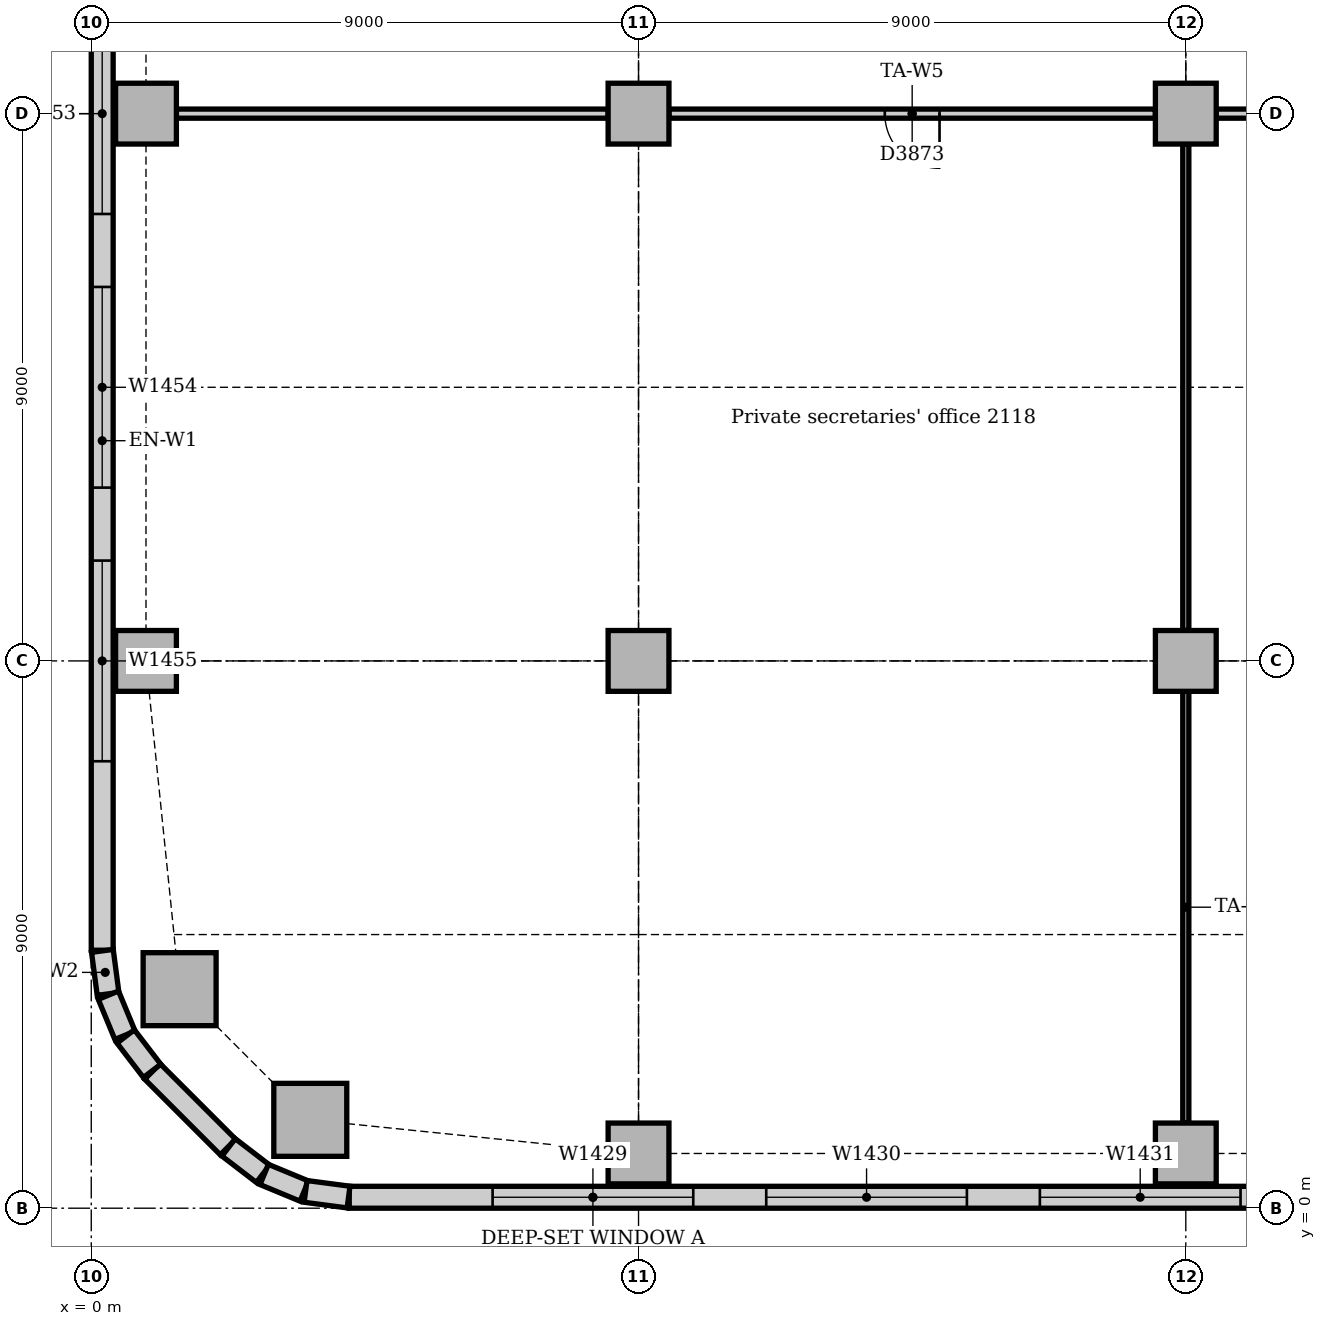
"""IFC4 building model, lengths in metres.
Left out: names, types, materials, properties, quantities, classifications, styles, units other than length and angle.
Written with IfcOpenShell. Run it as: python <this file> out.ifc"""

import sys

from ifc_helpers import new_model, si_unit, direction, frame, frame_2d, origin, origin_2d, place, context, subcontext, project, spatial, rectangle, extrude, element, fill, save


model = new_model("IFC4")
c1 = context("Model", 3, precision=1e-05, world=origin(), true_north=direction((0.0, 1.0)))
c2 = subcontext(c1, "Body", "Model", "MODEL_VIEW")
j1 = project(units=[si_unit("LENGTHUNIT", "METRE"), si_unit("PLANEANGLEUNIT", "RADIAN")], contexts=[c1])
p1 = place(None, origin())
s1 = spatial("IfcSite", under=j1, at=p1, CompositionType="ELEMENT")
p2 = place(p1, origin())
s2 = spatial("IfcBuilding", under=s1, at=p2, CompositionType="ELEMENT")
p3 = place(p2, frame((0.0, 0.0, 91.0)))
s3 = spatial("IfcBuildingStorey", under=s2, at=p3, CompositionType="ELEMENT", Elevation=91.0)
for number, where, z_axis, x_axis in (
    (1, (3.602, 1.453, 0.0), (0.0, 0.0, 1.0), (1.0, 0.0, 0.0)),
    (2, (1.453, 3.602, 0.0), (0.0, 0.0, 1.0), (1.0, 0.0, 0.0)),
):
    element("IfcColumn", number, at=place(p3, frame(where, z_axis=z_axis, x_axis=x_axis)), inside=s3, PredefinedType="COLUMN", context=c2, shape_type="SweptSolid", body=[
        extrude(rectangle(XDim=1.2, YDim=1.2, at=origin_2d()), origin(), (0.0, 0.0, 1.0), 3.7),
    ])
for number, where, z_axis, x_axis in (
    (3, (9.0, 0.9, 0.0), (0.0, 0.0, 1.0), (1.0, 0.0, 0.0)),
    (4, (18.0, 0.9, 0.0), (0.0, 0.0, 1.0), (1.0, 0.0, 0.0)),
    (5, (0.9, 9.0, 0.0), (0.0, 0.0, 1.0), (1.0, 0.0, 0.0)),
    (6, (0.9, 18.0, 0.0), (0.0, 0.0, 1.0), (1.0, 0.0, 0.0)),
    (7, (9.0, 9.0, 0.0), (0.0, 0.0, 1.0), (1.0, 0.0, 0.0)),
    (8, (9.0, 18.0, 0.0), (0.0, 0.0, 1.0), (1.0, 0.0, 0.0)),
    (9, (18.0, 9.0, 0.0), (0.0, 0.0, 1.0), (1.0, 0.0, 0.0)),
    (10, (18.0, 18.0, 0.0), (0.0, 0.0, 1.0), (1.0, 0.0, 0.0)),
):
    element("IfcColumn", number, at=place(p3, frame(where, z_axis=z_axis, x_axis=x_axis)), inside=s3, PredefinedType="COLUMN", context=c2, shape_type="SweptSolid", body=[
        extrude(rectangle(XDim=1.0, YDim=1.0, at=origin_2d()), origin(), (0.0, 0.0, 1.0), 3.7),
    ])
p4 = place(p3, frame((4.243, 0.18, 0.0), z_axis=(0.0, 0.0, 1.0), x_axis=(1.0, 0.0, 0.0)))
e11 = element("IfcWall", 11, at=p4, inside=s3, PredefinedType="STANDARD", context=c2, shape_type="SweptSolid", body=[
    extrude(rectangle(XDim=44.015, YDim=0.36, at=frame_2d((22.007, 0.0))), origin(), (0.0, 0.0, 1.0), 3.7),
])
p5 = place(p4, frame((2.357, 0.0, 0.9)))
e12 = element("IfcOpeningElement", 12, at=p5, cuts=e11, PredefinedType="OPENING", context=c2, shape_type="SweptSolid", body=[
    extrude(rectangle(XDim=3.3, YDim=1.6, at=frame_2d((1.65, 0.8))), frame((0.0, 0.19, 0.0), z_axis=(0.0, -1.0, 0.0), x_axis=(1.0, 0.0, 0.0)), (0.0, 0.0, 1.0), 0.38),
])
p6 = place(p4, frame((6.857, 0.0, 0.9)))
e13 = element("IfcOpeningElement", 13, at=p6, cuts=e11, PredefinedType="OPENING", context=c2, shape_type="SweptSolid", body=[
    extrude(rectangle(XDim=3.3, YDim=1.6, at=frame_2d((1.65, 0.8))), frame((0.0, 0.19, 0.0), z_axis=(0.0, -1.0, 0.0), x_axis=(1.0, 0.0, 0.0)), (0.0, 0.0, 1.0), 0.38),
])
p7 = place(p4, frame((11.357, 0.0, 0.9)))
e14 = element("IfcOpeningElement", 14, at=p7, cuts=e11, PredefinedType="OPENING", context=c2, shape_type="SweptSolid", body=[
    extrude(rectangle(XDim=3.3, YDim=1.6, at=frame_2d((1.65, 0.8))), frame((0.0, 0.19, 0.0), z_axis=(0.0, -1.0, 0.0), x_axis=(1.0, 0.0, 0.0)), (0.0, 0.0, 1.0), 0.38),
])
p8 = place(p4, frame((15.857, 0.0, 0.9)))
e15 = element("IfcOpeningElement", 15, at=p8, cuts=e11, PredefinedType="OPENING", context=c2, shape_type="SweptSolid", body=[
    extrude(rectangle(XDim=3.3, YDim=1.6, at=frame_2d((1.65, 0.8))), frame((0.0, 0.19, 0.0), z_axis=(0.0, -1.0, 0.0), x_axis=(1.0, 0.0, 0.0)), (0.0, 0.0, 1.0), 0.38),
])
p9 = place(p4, frame((20.357, 0.0, 0.9)))
e16 = element("IfcOpeningElement", 16, at=p9, cuts=e11, PredefinedType="OPENING", context=c2, shape_type="SweptSolid", body=[
    extrude(rectangle(XDim=3.3, YDim=1.6, at=frame_2d((1.65, 0.8))), frame((0.0, 0.19, 0.0), z_axis=(0.0, -1.0, 0.0), x_axis=(1.0, 0.0, 0.0)), (0.0, 0.0, 1.0), 0.38),
])
p10 = place(p4, frame((24.857, 0.0, 0.9)))
e17 = element("IfcOpeningElement", 17, at=p10, cuts=e11, PredefinedType="OPENING", context=c2, shape_type="SweptSolid", body=[
    extrude(rectangle(XDim=3.3, YDim=1.6, at=frame_2d((1.65, 0.8))), frame((0.0, 0.19, 0.0), z_axis=(0.0, -1.0, 0.0), x_axis=(1.0, 0.0, 0.0)), (0.0, 0.0, 1.0), 0.38),
])
p11 = place(p4, frame((29.357, 0.0, 0.9)))
e18 = element("IfcOpeningElement", 18, at=p11, cuts=e11, PredefinedType="OPENING", context=c2, shape_type="SweptSolid", body=[
    extrude(rectangle(XDim=3.3, YDim=1.6, at=frame_2d((1.65, 0.8))), frame((0.0, 0.19, 0.0), z_axis=(0.0, -1.0, 0.0), x_axis=(1.0, 0.0, 0.0)), (0.0, 0.0, 1.0), 0.38),
])
p12 = place(p4, frame((33.857, 0.0, 0.9)))
e19 = element("IfcOpeningElement", 19, at=p12, cuts=e11, PredefinedType="OPENING", context=c2, shape_type="SweptSolid", body=[
    extrude(rectangle(XDim=3.3, YDim=1.6, at=frame_2d((1.65, 0.8))), frame((0.0, 0.19, 0.0), z_axis=(0.0, -1.0, 0.0), x_axis=(1.0, 0.0, 0.0)), (0.0, 0.0, 1.0), 0.38),
])
p13 = place(p4, frame((38.357, 0.0, 0.9)))
e20 = element("IfcOpeningElement", 20, at=p13, cuts=e11, PredefinedType="OPENING", context=c2, shape_type="SweptSolid", body=[
    extrude(rectangle(XDim=3.3, YDim=1.6, at=frame_2d((1.65, 0.8))), frame((0.0, 0.19, 0.0), z_axis=(0.0, -1.0, 0.0), x_axis=(1.0, 0.0, 0.0)), (0.0, 0.0, 1.0), 0.38),
])
p14 = place(p3, frame((0.18, 21.0, 0.0), z_axis=(0.0, 0.0, 1.0), x_axis=(0.0, -1.0, 0.0)))
e21 = element("IfcWall", 21, at=p14, inside=s3, PredefinedType="STANDARD", context=c2, shape_type="SweptSolid", body=[
    extrude(rectangle(XDim=16.757, YDim=0.36, at=frame_2d((8.379, 0.0))), origin(), (0.0, 0.0, 1.0), 3.7),
])
p15 = place(p14, frame((1.35, 0.0, 0.9)))
e22 = element("IfcOpeningElement", 22, at=p15, cuts=e21, PredefinedType="OPENING", context=c2, shape_type="SweptSolid", body=[
    extrude(rectangle(XDim=3.3, YDim=1.6, at=frame_2d((1.65, 0.8))), frame((0.0, 0.19, 0.0), z_axis=(0.0, -1.0, 0.0), x_axis=(1.0, 0.0, 0.0)), (0.0, 0.0, 1.0), 0.38),
])
p16 = place(p14, frame((5.85, 0.0, 0.9)))
e23 = element("IfcOpeningElement", 23, at=p16, cuts=e21, PredefinedType="OPENING", context=c2, shape_type="SweptSolid", body=[
    extrude(rectangle(XDim=3.3, YDim=1.6, at=frame_2d((1.65, 0.8))), frame((0.0, 0.19, 0.0), z_axis=(0.0, -1.0, 0.0), x_axis=(1.0, 0.0, 0.0)), (0.0, 0.0, 1.0), 0.38),
])
p17 = place(p14, frame((10.35, 0.0, 0.9)))
e24 = element("IfcOpeningElement", 24, at=p17, cuts=e21, PredefinedType="OPENING", context=c2, shape_type="SweptSolid", body=[
    extrude(rectangle(XDim=3.3, YDim=1.6, at=frame_2d((1.65, 0.8))), frame((0.0, 0.19, 0.0), z_axis=(0.0, -1.0, 0.0), x_axis=(1.0, 0.0, 0.0)), (0.0, 0.0, 1.0), 0.38),
])
p18 = place(p3, frame((1.006, 2.249, 0.0), z_axis=(0.0, 0.0, 1.0), x_axis=(0.707106781187, -0.707106781187, 0.0)))
e25 = element("IfcWall", 25, at=p18, inside=s3, PredefinedType="STANDARD", context=c2, shape_type="SweptSolid", body=[
    extrude(rectangle(XDim=1.757, YDim=0.36, at=frame_2d((0.879, 0.0))), origin(), (0.0, 0.0, 1.0), 3.7),
])
for number, where, z_axis, x_axis in (
    (26, (0.183, 4.231, 0.0), (0.0, 0.0, 1.0), (0.131, -0.991, 0.0)),
    (27, (0.282, 3.503, 0.0), (0.0, 0.0, 1.0), (0.383, -0.924, 0.0)),
):
    element("IfcWall", number, at=place(p3, frame(where, z_axis=z_axis, x_axis=x_axis)), inside=s3, PredefinedType="STANDARD", context=c2, shape_type="SweptSolid", body=[
        extrude(rectangle(XDim=0.713, YDim=0.36, at=frame_2d((0.356, 0.0))), origin(), (0.0, 0.0, 1.0), 3.7),
    ])
for number, where, z_axis, x_axis in (
    (28, (0.566, 2.825, 0.0), (0.0, 0.0, 1.0), (0.609, -0.793, 0.0)),
    (29, (2.259, 1.0, 0.0), (0.0, 0.0, 1.0), (0.793, -0.609, 0.0)),
):
    element("IfcWall", number, at=place(p3, frame(where, z_axis=z_axis, x_axis=x_axis)), inside=s3, PredefinedType="STANDARD", context=c2, shape_type="SweptSolid", body=[
        extrude(rectangle(XDim=0.713, YDim=0.36, at=frame_2d((0.357, 0.0))), origin(), (0.0, 0.0, 1.0), 3.7),
    ])
for number, where, z_axis, x_axis in (
    (30, (2.844, 0.555, 0.0), (0.0, 0.0, 1.0), (0.924, -0.383, 0.0)),
    (31, (3.524, 0.276, 0.0), (0.0, 0.0, 1.0), (0.991, -0.131, 0.0)),
):
    element("IfcWall", number, at=place(p3, frame(where, z_axis=z_axis, x_axis=x_axis)), inside=s3, PredefinedType="STANDARD", context=c2, shape_type="SweptSolid", body=[
        extrude(rectangle(XDim=0.713, YDim=0.36, at=frame_2d((0.356, 0.0))), origin(), (0.0, 0.0, 1.0), 3.7),
    ])
p19 = place(p3, frame((18.5, 18.0, 0.0), z_axis=(0.0, 0.0, 1.0), x_axis=(1.0, 0.0, 0.0)))
e32 = element("IfcWall", 32, at=p19, inside=s3, PredefinedType="PARTITIONING", context=c2, shape_type="SweptSolid", body=[
    extrude(rectangle(XDim=8.0, YDim=0.15, at=frame_2d((4.0, 0.0))), origin(), (0.0, 0.0, 1.0), 3.0),
])
p20 = place(p3, frame((9.5, 18.0, 0.0), z_axis=(0.0, 0.0, 1.0), x_axis=(1.0, 0.0, 0.0)))
e33 = element("IfcWall", 33, at=p20, inside=s3, PredefinedType="PARTITIONING", context=c2, shape_type="SweptSolid", body=[
    extrude(rectangle(XDim=8.0, YDim=0.15, at=frame_2d((4.0, 0.0))), origin(), (0.0, 0.0, 1.0), 3.0),
])
p21 = place(p20, frame((3.55, 0.0, 0.0)))
e34 = element("IfcOpeningElement", 34, at=p21, cuts=e33, PredefinedType="OPENING", context=c2, shape_type="SweptSolid", body=[
    extrude(rectangle(XDim=0.9, YDim=2.1, at=frame_2d((0.45, 1.05))), frame((0.0, 0.085, 0.0), z_axis=(0.0, -1.0, 0.0), x_axis=(1.0, 0.0, 0.0)), (0.0, 0.0, 1.0), 0.17),
])
p22 = place(p3, frame((1.4, 18.0, 0.0), z_axis=(0.0, 0.0, 1.0), x_axis=(1.0, 0.0, 0.0)))
e35 = element("IfcWall", 35, at=p22, inside=s3, PredefinedType="PARTITIONING", context=c2, shape_type="SweptSolid", body=[
    extrude(rectangle(XDim=7.1, YDim=0.15, at=frame_2d((3.55, 0.0))), origin(), (0.0, 0.0, 1.0), 3.0),
])
p23 = place(p3, frame((18.0, 1.4, 0.0), z_axis=(0.0, 0.0, 1.0), x_axis=(0.0, 1.0, 0.0)))
e36 = element("IfcWall", 36, at=p23, inside=s3, PredefinedType="PARTITIONING", context=c2, shape_type="SweptSolid", body=[
    extrude(rectangle(XDim=7.1, YDim=0.1, at=frame_2d((3.55, 0.0))), origin(), (0.0, 0.0, 1.0), 3.008),
])
p24 = place(p3, frame((18.0, 9.5, 0.0), z_axis=(0.0, 0.0, 1.0), x_axis=(0.0, 1.0, 0.0)))
e37 = element("IfcWall", 37, at=p24, inside=s3, PredefinedType="PARTITIONING", context=c2, shape_type="SweptSolid", body=[
    extrude(rectangle(XDim=8.0, YDim=0.1, at=frame_2d((4.0, 0.0))), origin(), (0.0, 0.0, 1.0), 3.008),
])
p25 = place(p5, origin())
e38 = element("IfcWindow", 38, at=p25, inside=s3, PartitioningType="SINGLE_PANEL", PredefinedType="WINDOW", context=c2, shape_type="SweptSolid", body=[
    extrude(rectangle(XDim=3.3, YDim=1.6, at=frame_2d((1.65, 0.8))), frame((0.0, 0.13, 0.0), z_axis=(0.0, -1.0, 0.0), x_axis=(1.0, 0.0, 0.0)), (0.0, 0.0, 1.0), 0.06),
])
fill(e12, e38)
p26 = place(p6, origin())
e39 = element("IfcWindow", 39, at=p26, inside=s3, PartitioningType="SINGLE_PANEL", PredefinedType="WINDOW", context=c2, shape_type="SweptSolid", body=[
    extrude(rectangle(XDim=3.3, YDim=1.6, at=frame_2d((1.65, 0.8))), frame((0.0, 0.13, 0.0), z_axis=(0.0, -1.0, 0.0), x_axis=(1.0, 0.0, 0.0)), (0.0, 0.0, 1.0), 0.06),
])
fill(e13, e39)
p27 = place(p7, origin())
e40 = element("IfcWindow", 40, at=p27, inside=s3, PartitioningType="SINGLE_PANEL", PredefinedType="WINDOW", context=c2, shape_type="SweptSolid", body=[
    extrude(rectangle(XDim=3.3, YDim=1.6, at=frame_2d((1.65, 0.8))), frame((0.0, 0.13, 0.0), z_axis=(0.0, -1.0, 0.0), x_axis=(1.0, 0.0, 0.0)), (0.0, 0.0, 1.0), 0.06),
])
fill(e14, e40)
p28 = place(p15, origin())
e41 = element("IfcWindow", 41, at=p28, inside=s3, PartitioningType="SINGLE_PANEL", PredefinedType="WINDOW", context=c2, shape_type="SweptSolid", body=[
    extrude(rectangle(XDim=3.3, YDim=1.6, at=frame_2d((1.65, 0.8))), frame((0.0, 0.13, 0.0), z_axis=(0.0, -1.0, 0.0), x_axis=(1.0, 0.0, 0.0)), (0.0, 0.0, 1.0), 0.06),
])
fill(e22, e41)
p29 = place(p16, origin())
e42 = element("IfcWindow", 42, at=p29, inside=s3, PartitioningType="SINGLE_PANEL", PredefinedType="WINDOW", context=c2, shape_type="SweptSolid", body=[
    extrude(rectangle(XDim=3.3, YDim=1.6, at=frame_2d((1.65, 0.8))), frame((0.0, 0.13, 0.0), z_axis=(0.0, -1.0, 0.0), x_axis=(1.0, 0.0, 0.0)), (0.0, 0.0, 1.0), 0.06),
])
fill(e23, e42)
p30 = place(p17, origin())
e43 = element("IfcWindow", 43, at=p30, inside=s3, PartitioningType="SINGLE_PANEL", PredefinedType="WINDOW", context=c2, shape_type="SweptSolid", body=[
    extrude(rectangle(XDim=3.3, YDim=1.6, at=frame_2d((1.65, 0.8))), frame((0.0, 0.13, 0.0), z_axis=(0.0, -1.0, 0.0), x_axis=(1.0, 0.0, 0.0)), (0.0, 0.0, 1.0), 0.06),
])
fill(e24, e43)
p31 = place(p21, frame((0.9, 0.0, 0.0), z_axis=(0.0, 0.0, 1.0), x_axis=(-1.0, 0.0, 0.0)))
e44 = element("IfcDoor", 44, at=p31, inside=s3, OperationType="SINGLE_SWING_LEFT", PredefinedType="DOOR", context=c2, shape_type="SweptSolid", body=[
    extrude(rectangle(XDim=0.9, YDim=2.1, at=frame_2d((0.45, 1.05))), frame((0.0, 0.025, 0.0), z_axis=(0.0, -1.0, 0.0), x_axis=(1.0, 0.0, 0.0)), (0.0, 0.0, 1.0), 0.05),
])
fill(e34, e44)
save(model, sys.argv[1])
